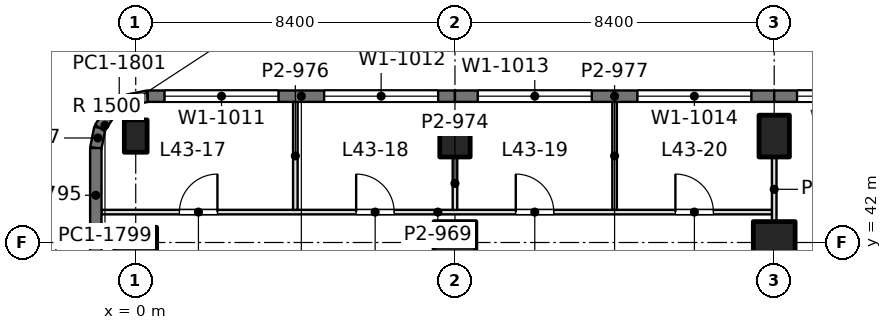
"""IFC4 building model, lengths in metres.
Left out: names, types, materials, properties, quantities, classifications, styles, units other than length and angle.
Written with IfcOpenShell. Run it as: python <this file> out.ifc"""

import sys

from ifc_helpers import new_model, si_unit, direction, frame, frame_2d, origin, origin_2d, place, context, subcontext, project, spatial, rectangle, extrude, element, fill, save


model = new_model("IFC4")
c1 = context("Model", 3, precision=1e-05, world=origin(), true_north=direction((0.0, 1.0)))
c2 = subcontext(c1, "Body", "Model", "MODEL_VIEW")
j1 = project(units=[si_unit("LENGTHUNIT", "METRE"), si_unit("PLANEANGLEUNIT", "RADIAN")], contexts=[c1])
p1 = place(None, origin())
s1 = spatial("IfcSite", under=j1, at=p1, CompositionType="ELEMENT")
p2 = place(p1, origin())
s2 = spatial("IfcBuilding", under=s1, at=p2, CompositionType="ELEMENT")
p3 = place(p2, frame((0.0, 0.0, 190.2)))
s3 = spatial("IfcBuildingStorey", under=s2, at=p3, CompositionType="ELEMENT", Elevation=190.2)
p4 = place(p3, frame((0.0, 42.0, 0.0), z_axis=(0.0, 0.0, 1.0), x_axis=(0.0, 1.0, 0.0)))
e1 = element("IfcColumn", 1, at=p4, inside=s3, PredefinedType="COLUMN", context=c2, shape_type="SweptSolid", body=[
    extrude(rectangle(XDim=0.8, YDim=1.1, at=origin_2d()), origin(), (0.0, 0.0, 1.0), 4.2),
])
p5 = place(p3, frame((0.0, 44.8, 0.0), z_axis=(0.0, 0.0, 1.0), x_axis=(1.0, 0.0, 0.0)))
e2 = element("IfcColumn", 2, at=p5, inside=s3, PredefinedType="COLUMN", context=c2, shape_type="SweptSolid", body=[
    extrude(rectangle(XDim=0.6, YDim=0.85, at=origin_2d()), origin(), (0.0, 0.0, 1.0), 4.2),
])
p6 = place(p3, frame((8.4, 42.0, 0.0), z_axis=(0.0, 0.0, 1.0), x_axis=(1.0, 0.0, 0.0)))
e3 = element("IfcColumn", 3, at=p6, inside=s3, PredefinedType="COLUMN", context=c2, shape_type="SweptSolid", body=[
    extrude(rectangle(XDim=1.1, YDim=1.1, at=origin_2d()), origin(), (0.0, 0.0, 1.0), 4.2),
])
p7 = place(p3, frame((8.4, 44.8, 0.0), z_axis=(0.0, 0.0, 1.0), x_axis=(1.0, 0.0, 0.0)))
e4 = element("IfcColumn", 4, at=p7, inside=s3, PredefinedType="COLUMN", context=c2, shape_type="SweptSolid", body=[
    extrude(rectangle(XDim=0.8, YDim=1.1, at=origin_2d()), origin(), (0.0, 0.0, 1.0), 4.2),
])
p8 = place(p3, frame((16.8, 42.0, 0.0), z_axis=(0.0, 0.0, 1.0), x_axis=(1.0, 0.0, 0.0)))
e5 = element("IfcColumn", 5, at=p8, inside=s3, PredefinedType="COLUMN", context=c2, shape_type="SweptSolid", body=[
    extrude(rectangle(XDim=1.1, YDim=1.1, at=origin_2d()), origin(), (0.0, 0.0, 1.0), 4.2),
])
p9 = place(p3, frame((16.8, 44.8, 0.0), z_axis=(0.0, 0.0, 1.0), x_axis=(1.0, 0.0, 0.0)))
e6 = element("IfcColumn", 6, at=p9, inside=s3, PredefinedType="COLUMN", context=c2, shape_type="SweptSolid", body=[
    extrude(rectangle(XDim=0.8, YDim=1.1, at=origin_2d()), origin(), (0.0, 0.0, 1.0), 4.2),
])
p10 = place(p3, frame((-1.05, 37.725, 0.0), z_axis=(0.0, 0.0, 1.0), x_axis=(0.0, 1.0, 0.0)))
e7 = element("IfcWall", 7, at=p10, inside=s3, PredefinedType="SOLIDWALL", context=c2, shape_type="SweptSolid", body=[
    extrude(rectangle(XDim=4.275, YDim=0.3, at=frame_2d((2.137, 0.0))), origin(), (0.0, 0.0, 1.0), 4.05),
])
p11 = place(p10, frame((0.938, 0.0, 0.9)))
e8 = element("IfcOpeningElement", 8, at=p11, cuts=e7, PredefinedType="OPENING", context=c2, shape_type="SweptSolid", body=[
    extrude(rectangle(XDim=2.4, YDim=1.9, at=frame_2d((1.2, 0.95))), frame((0.0, 0.16, 0.0), z_axis=(0.0, -1.0, 0.0), x_axis=(1.0, 0.0, 0.0)), (0.0, 0.0, 1.0), 0.32),
])
p12 = place(p3, frame((-1.05, 42.0, 0.0), z_axis=(0.0, 0.0, 1.0), x_axis=(0.0, 1.0, 0.0)))
e9 = element("IfcWall", 9, at=p12, inside=s3, PredefinedType="SOLIDWALL", context=c2, shape_type="SweptSolid", body=[
    extrude(rectangle(XDim=2.485, YDim=0.3, at=frame_2d((1.243, 0.0))), origin(), (0.0, 0.0, 1.0), 4.05),
])
p13 = place(p3, frame((-1.05, 44.485, 0.0), z_axis=(0.0, 0.0, 1.0), x_axis=(0.195073962632, 0.980788534345, 0.0)))
e10 = element("IfcWall", 10, at=p13, inside=s3, PredefinedType="SOLIDWALL", context=c2, shape_type="SweptSolid", body=[
    extrude(rectangle(XDim=0.541, YDim=0.3, at=frame_2d((0.271, 0.0))), origin(), (0.0, 0.0, 1.0), 4.05),
])
p14 = place(p3, frame((-0.945, 45.015, 0.0), z_axis=(0.0, 0.0, 1.0), x_axis=(0.55534295404, 0.831621430339, 0.0)))
e11 = element("IfcWall", 11, at=p14, inside=s3, PredefinedType="SOLIDWALL", context=c2, shape_type="SweptSolid", body=[
    extrude(rectangle(XDim=0.526, YDim=0.3, at=frame_2d((0.263, 0.0))), origin(), (0.0, 0.0, 1.0), 4.05),
])
p15 = place(p3, frame((-0.653, 45.453, 0.0), z_axis=(0.0, 0.0, 1.0), x_axis=(0.831692711774, 0.555236195849, 0.0)))
e12 = element("IfcWall", 12, at=p15, inside=s3, PredefinedType="SOLIDWALL", context=c2, shape_type="SweptSolid", body=[
    extrude(rectangle(XDim=0.525, YDim=0.3, at=frame_2d((0.263, 0.0))), origin(), (0.0, 0.0, 1.0), 4.05),
])
p16 = place(p3, frame((-0.216, 45.744, 0.0), z_axis=(0.0, 0.0, 1.0), x_axis=(0.980702050465, 0.1955082817, 0.0)))
e13 = element("IfcWall", 13, at=p16, inside=s3, PredefinedType="SOLIDWALL", context=c2, shape_type="SweptSolid", body=[
    extrude(rectangle(XDim=0.541, YDim=0.3, at=frame_2d((0.271, 0.0))), origin(), (0.0, 0.0, 1.0), 4.05),
])
p17 = place(p3, frame((0.315, 45.85, 0.0), z_axis=(0.0, 0.0, 1.0), x_axis=(1.0, 0.0, 0.0)))
e14 = element("IfcWall", 14, at=p17, inside=s3, PredefinedType="SOLIDWALL", context=c2, shape_type="SweptSolid", body=[
    extrude(rectangle(XDim=8.085, YDim=0.3, at=frame_2d((4.042, 0.0))), origin(), (0.0, 0.0, 1.0), 4.05),
])
p18 = place(p17, frame((0.443, 0.0, 0.9)))
e15 = element("IfcOpeningElement", 15, at=p18, cuts=e14, PredefinedType="OPENING", context=c2, shape_type="SweptSolid", body=[
    extrude(rectangle(XDim=3.0, YDim=1.9, at=frame_2d((1.5, 0.95))), frame((0.0, 0.16, 0.0), z_axis=(0.0, -1.0, 0.0), x_axis=(1.0, 0.0, 0.0)), (0.0, 0.0, 1.0), 0.32),
])
p19 = place(p17, frame((4.643, 0.0, 0.9)))
e16 = element("IfcOpeningElement", 16, at=p19, cuts=e14, PredefinedType="OPENING", context=c2, shape_type="SweptSolid", body=[
    extrude(rectangle(XDim=3.0, YDim=1.9, at=frame_2d((1.5, 0.95))), frame((0.0, 0.16, 0.0), z_axis=(0.0, -1.0, 0.0), x_axis=(1.0, 0.0, 0.0)), (0.0, 0.0, 1.0), 0.32),
])
p20 = place(p3, frame((8.4, 45.85, 0.0), z_axis=(0.0, 0.0, 1.0), x_axis=(1.0, 0.0, 0.0)))
e17 = element("IfcWall", 17, at=p20, inside=s3, PredefinedType="SOLIDWALL", context=c2, shape_type="SweptSolid", body=[
    extrude(rectangle(XDim=8.4, YDim=0.3, at=frame_2d((4.2, 0.0))), origin(), (0.0, 0.0, 1.0), 4.05),
])
p21 = place(p20, frame((0.6, 0.0, 0.9)))
e18 = element("IfcOpeningElement", 18, at=p21, cuts=e17, PredefinedType="OPENING", context=c2, shape_type="SweptSolid", body=[
    extrude(rectangle(XDim=3.0, YDim=1.9, at=frame_2d((1.5, 0.95))), frame((0.0, 0.16, 0.0), z_axis=(0.0, -1.0, 0.0), x_axis=(1.0, 0.0, 0.0)), (0.0, 0.0, 1.0), 0.32),
])
p22 = place(p20, frame((4.8, 0.0, 0.9)))
e19 = element("IfcOpeningElement", 19, at=p22, cuts=e17, PredefinedType="OPENING", context=c2, shape_type="SweptSolid", body=[
    extrude(rectangle(XDim=3.0, YDim=1.9, at=frame_2d((1.5, 0.95))), frame((0.0, 0.16, 0.0), z_axis=(0.0, -1.0, 0.0), x_axis=(1.0, 0.0, 0.0)), (0.0, 0.0, 1.0), 0.32),
])
p23 = place(p3, frame((16.8, 45.85, 0.0), z_axis=(0.0, 0.0, 1.0), x_axis=(1.0, 0.0, 0.0)))
e20 = element("IfcWall", 20, at=p23, inside=s3, PredefinedType="SOLIDWALL", context=c2, shape_type="SweptSolid", body=[
    extrude(rectangle(XDim=8.4, YDim=0.3, at=frame_2d((4.2, 0.0))), origin(), (0.0, 0.0, 1.0), 4.05),
])
p24 = place(p23, frame((0.6, 0.0, 0.9)))
e21 = element("IfcOpeningElement", 21, at=p24, cuts=e20, PredefinedType="OPENING", context=c2, shape_type="SweptSolid", body=[
    extrude(rectangle(XDim=3.0, YDim=1.9, at=frame_2d((1.5, 0.95))), frame((0.0, 0.16, 0.0), z_axis=(0.0, -1.0, 0.0), x_axis=(1.0, 0.0, 0.0)), (0.0, 0.0, 1.0), 0.32),
])
p25 = place(p23, frame((4.8, 0.0, 0.9)))
e22 = element("IfcOpeningElement", 22, at=p25, cuts=e20, PredefinedType="OPENING", context=c2, shape_type="SweptSolid", body=[
    extrude(rectangle(XDim=3.0, YDim=1.9, at=frame_2d((1.5, 0.95))), frame((0.0, 0.16, 0.0), z_axis=(0.0, -1.0, 0.0), x_axis=(1.0, 0.0, 0.0)), (0.0, 0.0, 1.0), 0.32),
])
p26 = place(p3, frame((-0.902, 42.8, 0.0), z_axis=(0.0, 0.0, 1.0), x_axis=(1.0, 0.0, 0.0)))
e23 = element("IfcWall", 23, at=p26, inside=s3, PredefinedType="PARTITIONING", context=c2, shape_type="SweptSolid", body=[
    extrude(rectangle(XDim=17.702, YDim=0.12, at=frame_2d((8.851, 0.0))), origin(), (0.0, 0.0, 1.0), 3.56),
])
p27 = place(p26, frame((2.052, 0.0, 0.0)))
e24 = element("IfcOpeningElement", 24, at=p27, cuts=e23, PredefinedType="OPENING", context=c2, shape_type="SweptSolid", body=[
    extrude(rectangle(XDim=1.0, YDim=2.4, at=frame_2d((0.5, 1.2))), frame((0.0, 0.07, 0.0), z_axis=(0.0, -1.0, 0.0), x_axis=(1.0, 0.0, 0.0)), (0.0, 0.0, 1.0), 0.14),
])
p28 = place(p26, frame((6.702, 0.0, 0.0)))
e25 = element("IfcOpeningElement", 25, at=p28, cuts=e23, PredefinedType="OPENING", context=c2, shape_type="SweptSolid", body=[
    extrude(rectangle(XDim=1.0, YDim=2.4, at=frame_2d((0.5, 1.2))), frame((0.0, 0.07, 0.0), z_axis=(0.0, -1.0, 0.0), x_axis=(1.0, 0.0, 0.0)), (0.0, 0.0, 1.0), 0.14),
])
p29 = place(p26, frame((10.902, 0.0, 0.0)))
e26 = element("IfcOpeningElement", 26, at=p29, cuts=e23, PredefinedType="OPENING", context=c2, shape_type="SweptSolid", body=[
    extrude(rectangle(XDim=1.0, YDim=2.4, at=frame_2d((0.5, 1.2))), frame((0.0, 0.07, 0.0), z_axis=(0.0, -1.0, 0.0), x_axis=(1.0, 0.0, 0.0)), (0.0, 0.0, 1.0), 0.14),
])
p30 = place(p26, frame((15.102, 0.0, 0.0)))
e27 = element("IfcOpeningElement", 27, at=p30, cuts=e23, PredefinedType="OPENING", context=c2, shape_type="SweptSolid", body=[
    extrude(rectangle(XDim=1.0, YDim=2.4, at=frame_2d((0.5, 1.2))), frame((0.0, 0.07, 0.0), z_axis=(0.0, -1.0, 0.0), x_axis=(1.0, 0.0, 0.0)), (0.0, 0.0, 1.0), 0.14),
])
p31 = place(p3, frame((4.2, 42.858, 0.0), z_axis=(0.0, 0.0, 1.0), x_axis=(0.0, 1.0, 0.0)))
e28 = element("IfcWall", 28, at=p31, inside=s3, PredefinedType="PARTITIONING", context=c2, shape_type="SweptSolid", body=[
    extrude(rectangle(XDim=2.844, YDim=0.12, at=frame_2d((1.422, 0.0))), origin(), (0.0, 0.0, 1.0), 3.56),
])
p32 = place(p3, frame((8.4, 42.858, 0.0), z_axis=(0.0, 0.0, 1.0), x_axis=(0.0, 1.0, 0.0)))
e29 = element("IfcWall", 29, at=p32, inside=s3, PredefinedType="PARTITIONING", context=c2, shape_type="SweptSolid", body=[
    extrude(rectangle(XDim=1.393, YDim=0.12, at=frame_2d((0.697, 0.0))), origin(), (0.0, 0.0, 1.0), 3.69),
])
p33 = place(p3, frame((12.6, 42.858, 0.0), z_axis=(0.0, 0.0, 1.0), x_axis=(0.0, 1.0, 0.0)))
e30 = element("IfcWall", 30, at=p33, inside=s3, PredefinedType="PARTITIONING", context=c2, shape_type="SweptSolid", body=[
    extrude(rectangle(XDim=2.844, YDim=0.12, at=frame_2d((1.422, 0.0))), origin(), (0.0, 0.0, 1.0), 3.56),
])
p34 = place(p3, frame((16.8, 42.548, 0.0), z_axis=(0.0, 0.0, 1.0), x_axis=(0.0, 1.0, 0.0)))
e31 = element("IfcWall", 31, at=p34, inside=s3, PredefinedType="PARTITIONING", context=c2, shape_type="SweptSolid", body=[
    extrude(rectangle(XDim=1.703, YDim=0.12, at=frame_2d((0.852, 0.0))), origin(), (0.0, 0.0, 1.0), 3.69),
])
p35 = place(p18, origin())
e32 = element("IfcWindow", 32, at=p35, inside=s3, PartitioningType="SINGLE_PANEL", PredefinedType="WINDOW", context=c2, shape_type="SweptSolid", body=[
    extrude(rectangle(XDim=3.0, YDim=1.9, at=frame_2d((1.5, 0.95))), frame((0.0, 0.03, 0.0), z_axis=(0.0, -1.0, 0.0), x_axis=(1.0, 0.0, 0.0)), (0.0, 0.0, 1.0), 0.06),
])
fill(e15, e32)
p36 = place(p19, origin())
e33 = element("IfcWindow", 33, at=p36, inside=s3, PartitioningType="SINGLE_PANEL", PredefinedType="WINDOW", context=c2, shape_type="SweptSolid", body=[
    extrude(rectangle(XDim=3.0, YDim=1.9, at=frame_2d((1.5, 0.95))), frame((0.0, 0.03, 0.0), z_axis=(0.0, -1.0, 0.0), x_axis=(1.0, 0.0, 0.0)), (0.0, 0.0, 1.0), 0.06),
])
fill(e16, e33)
p37 = place(p21, origin())
e34 = element("IfcWindow", 34, at=p37, inside=s3, PartitioningType="SINGLE_PANEL", PredefinedType="WINDOW", context=c2, shape_type="SweptSolid", body=[
    extrude(rectangle(XDim=3.0, YDim=1.9, at=frame_2d((1.5, 0.95))), frame((0.0, 0.03, 0.0), z_axis=(0.0, -1.0, 0.0), x_axis=(1.0, 0.0, 0.0)), (0.0, 0.0, 1.0), 0.06),
])
fill(e18, e34)
p38 = place(p22, origin())
e35 = element("IfcWindow", 35, at=p38, inside=s3, PartitioningType="SINGLE_PANEL", PredefinedType="WINDOW", context=c2, shape_type="SweptSolid", body=[
    extrude(rectangle(XDim=3.0, YDim=1.9, at=frame_2d((1.5, 0.95))), frame((0.0, 0.03, 0.0), z_axis=(0.0, -1.0, 0.0), x_axis=(1.0, 0.0, 0.0)), (0.0, 0.0, 1.0), 0.06),
])
fill(e19, e35)
p39 = place(p24, origin())
e36 = element("IfcWindow", 36, at=p39, inside=s3, PartitioningType="SINGLE_PANEL", PredefinedType="WINDOW", context=c2, shape_type="SweptSolid", body=[
    extrude(rectangle(XDim=3.0, YDim=1.9, at=frame_2d((1.5, 0.95))), frame((0.0, 0.03, 0.0), z_axis=(0.0, -1.0, 0.0), x_axis=(1.0, 0.0, 0.0)), (0.0, 0.0, 1.0), 0.06),
])
fill(e21, e36)
p40 = place(p27, origin())
e37 = element("IfcDoor", 37, at=p40, inside=s3, OperationType="SINGLE_SWING_RIGHT", PredefinedType="DOOR", context=c2, shape_type="SweptSolid", body=[
    extrude(rectangle(XDim=1.0, YDim=2.4, at=frame_2d((0.5, 1.2))), frame((0.0, 0.025, 0.0), z_axis=(0.0, -1.0, 0.0), x_axis=(1.0, 0.0, 0.0)), (0.0, 0.0, 1.0), 0.05),
])
fill(e24, e37)
p41 = place(p28, origin())
e38 = element("IfcDoor", 38, at=p41, inside=s3, OperationType="SINGLE_SWING_LEFT", PredefinedType="DOOR", context=c2, shape_type="SweptSolid", body=[
    extrude(rectangle(XDim=1.0, YDim=2.4, at=frame_2d((0.5, 1.2))), frame((0.0, 0.025, 0.0), z_axis=(0.0, -1.0, 0.0), x_axis=(1.0, 0.0, 0.0)), (0.0, 0.0, 1.0), 0.05),
])
fill(e25, e38)
p42 = place(p29, origin())
e39 = element("IfcDoor", 39, at=p42, inside=s3, OperationType="SINGLE_SWING_LEFT", PredefinedType="DOOR", context=c2, shape_type="SweptSolid", body=[
    extrude(rectangle(XDim=1.0, YDim=2.4, at=frame_2d((0.5, 1.2))), frame((0.0, 0.025, 0.0), z_axis=(0.0, -1.0, 0.0), x_axis=(1.0, 0.0, 0.0)), (0.0, 0.0, 1.0), 0.05),
])
fill(e26, e39)
p43 = place(p30, origin())
e40 = element("IfcDoor", 40, at=p43, inside=s3, OperationType="SINGLE_SWING_LEFT", PredefinedType="DOOR", context=c2, shape_type="SweptSolid", body=[
    extrude(rectangle(XDim=1.0, YDim=2.4, at=frame_2d((0.5, 1.2))), frame((0.0, 0.025, 0.0), z_axis=(0.0, -1.0, 0.0), x_axis=(1.0, 0.0, 0.0)), (0.0, 0.0, 1.0), 0.05),
])
fill(e27, e40)
save(model, sys.argv[1])
